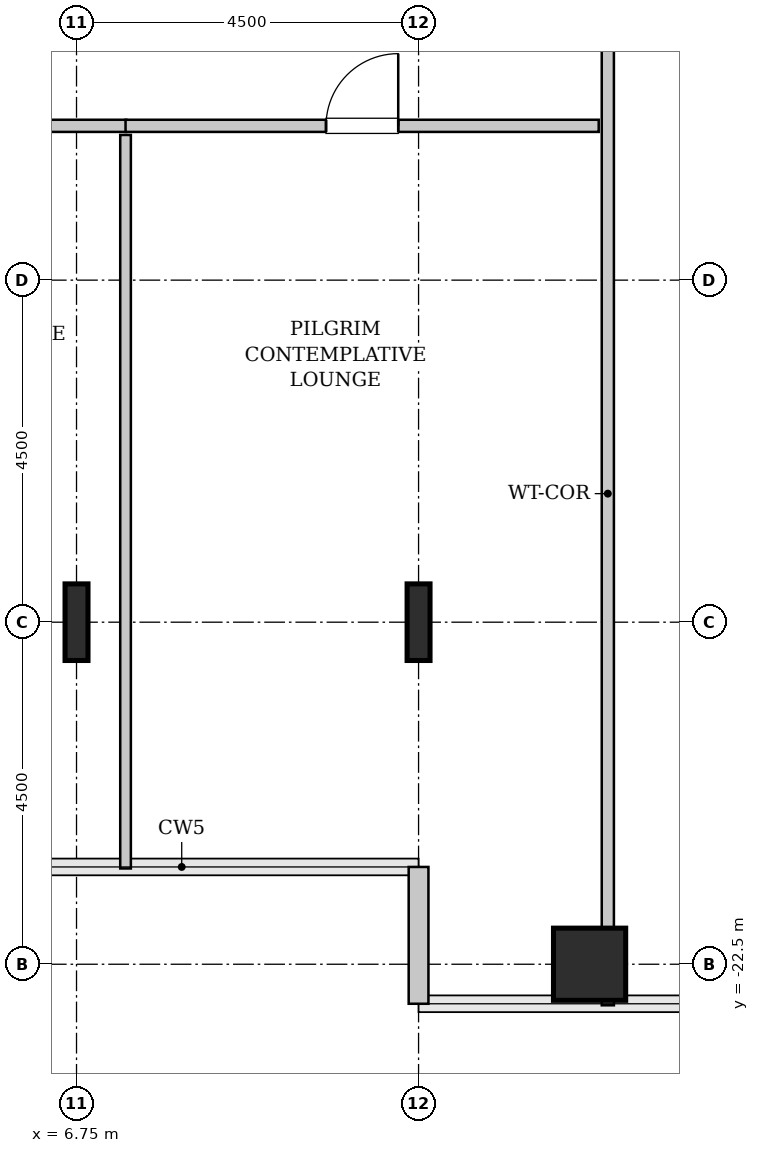
"""IFC4 building model, lengths in metres.
Left out: names, types, materials, properties, quantities, classifications, styles, units other than length and angle.
Written with IfcOpenShell. Run it as: python <this file> out.ifc"""

import sys

from ifc_helpers import new_model, si_unit, direction, frame, frame_2d, origin, origin_2d, place, context, subcontext, project, spatial, rectangle, hollow_rectangle, i_section, extrude, source, transform, mapped, element, fill, save


model = new_model("IFC4")
c1 = context("Model", 3, precision=1e-05, world=origin(), true_north=direction((0.0, 1.0)))
c2 = subcontext(c1, "Body", "Model", "MODEL_VIEW")
j1 = project(units=[si_unit("LENGTHUNIT", "METRE"), si_unit("PLANEANGLEUNIT", "RADIAN")], contexts=[c1])
p1 = place(None, origin())
s1 = spatial("IfcSite", under=j1, at=p1, CompositionType="ELEMENT")
p2 = place(p1, origin())
s2 = spatial("IfcBuilding", under=s1, at=p2, CompositionType="ELEMENT")
p3 = place(p2, frame((0.0, 0.0, 90.8)))
s3 = spatial("IfcBuildingStorey", under=s2, at=p3, CompositionType="ELEMENT", Elevation=90.8)
m1 = source(origin(), c2, "Body", "SweptSolid", [
    extrude(i_section(OverallWidth=0.302, OverallDepth=1.008, WebThickness=0.021, FlangeThickness=0.04, FilletRadius=0.03, at=origin_2d()), origin(), (0.0, 0.0, 1.0), 3.8),
])
for number, where, z_axis, x_axis in (
    (1, (6.75, -18.0, 0.0), (0.0, 0.0, 1.0), (1.0, 0.0, 0.0)),
    (2, (11.25, -18.0, 0.0), (0.0, 0.0, 1.0), (1.0, 0.0, 0.0)),
):
    element("IfcColumn", number, at=place(p3, frame(where, z_axis=z_axis, x_axis=x_axis)), inside=s3, PredefinedType="COLUMN", context=c2, shape_type="MappedRepresentation", body=[
        mapped(m1, transform((0.0, 0.0, 0.0), x_axis=(1.0, 0.0, 0.0), y_axis=(0.0, 1.0, 0.0), z_axis=(0.0, 0.0, 1.0), scale=1.0)),
    ])
m2 = source(origin(), c2, "Body", "SweptSolid", [
    extrude(hollow_rectangle(XDim=0.95, YDim=0.95, WallThickness=0.045, InnerFilletRadius=0.045, OuterFilletRadius=0.09, at=origin_2d()), origin(), (0.0, 0.0, 1.0), 3.8),
])
p4 = place(p3, frame((13.5, -22.5, 0.0), z_axis=(0.0, 0.0, 1.0), x_axis=(1.0, 0.0, 0.0)))
e3 = element("IfcColumn", 3, at=p4, inside=s3, PredefinedType="COLUMN", context=c2, shape_type="MappedRepresentation", body=[
    mapped(m2, transform((0.0, 0.0, 0.0), x_axis=(1.0, 0.0, 0.0), y_axis=(0.0, 1.0, 0.0), z_axis=(0.0, 0.0, 1.0), scale=1.0)),
])
m3 = source(origin(), c2, "Body", "SweptSolid", [
    extrude(rectangle(XDim=1.8, YDim=0.26, at=frame_2d((0.9, 0.0))), origin(), (0.0, 0.0, 1.0), 3.55),
])
p5 = place(p3, frame((11.25, -21.22, 0.0), z_axis=(0.0, 0.0, 1.0), x_axis=(0.0, -1.0, 0.0)))
e4 = element("IfcWall", 4, at=p5, inside=s3, PredefinedType="SOLIDWALL", context=c2, shape_type="MappedRepresentation", body=[
    mapped(m3, transform((0.0, 0.0, 0.0), x_axis=(1.0, 0.0, 0.0), y_axis=(0.0, 1.0, 0.0), z_axis=(0.0, 0.0, 1.0), scale=1.0)),
])
m4 = source(origin(), c2, "Body", "SweptSolid", [
    extrude(rectangle(XDim=16.245, YDim=0.16, at=frame_2d((8.123, 0.0))), origin(), (0.0, 0.0, 1.0), 3.535),
])
p6 = place(p3, frame((13.74, -23.04, 0.0), z_axis=(0.0, 0.0, 1.0), x_axis=(0.0, 1.0, 0.0)))
e5 = element("IfcWall", 5, at=p6, inside=s3, PredefinedType="PARTITIONING", context=c2, shape_type="MappedRepresentation", body=[
    mapped(m4, transform((0.0, 0.0, 0.0), x_axis=(1.0, 0.0, 0.0), y_axis=(0.0, 1.0, 0.0), z_axis=(0.0, 0.0, 1.0), scale=1.0)),
])
p7 = place(p6, frame((13.413, 0.0, 0.0)))
e6 = element("IfcOpeningElement", 6, at=p7, cuts=e5, PredefinedType="OPENING", context=c2, shape_type="SweptSolid", body=[
    extrude(rectangle(XDim=0.95, YDim=2.1, at=frame_2d((0.475, 1.05))), frame((0.0, 0.09, 0.0), z_axis=(0.0, -1.0, 0.0), x_axis=(1.0, 0.0, 0.0)), (0.0, 0.0, 1.0), 0.18),
])
m5 = source(origin(), c2, "Body", "SweptSolid", [
    extrude(rectangle(XDim=3.905, YDim=0.16, at=frame_2d((1.953, 0.0))), origin(), (0.0, 0.0, 1.0), 3.535),
])
p8 = place(p3, frame((3.5, -11.47, 0.0), z_axis=(0.0, 0.0, 1.0), x_axis=(1.0, 0.0, 0.0)))
e7 = element("IfcWall", 7, at=p8, inside=s3, PredefinedType="PARTITIONING", context=c2, shape_type="MappedRepresentation", body=[
    mapped(m5, transform((0.0, 0.0, 0.0), x_axis=(1.0, 0.0, 0.0), y_axis=(0.0, 1.0, 0.0), z_axis=(0.0, 0.0, 1.0), scale=1.0)),
])
p9 = place(p8, frame((1.478, 0.0, 0.0)))
e8 = element("IfcOpeningElement", 8, at=p9, cuts=e7, PredefinedType="OPENING", context=c2, shape_type="SweptSolid", body=[
    extrude(rectangle(XDim=0.95, YDim=2.1, at=frame_2d((0.475, 1.05))), frame((0.0, 0.09, 0.0), z_axis=(0.0, -1.0, 0.0), x_axis=(1.0, 0.0, 0.0)), (0.0, 0.0, 1.0), 0.18),
])
m6 = source(origin(), c2, "Body", "SweptSolid", [
    extrude(rectangle(XDim=9.65, YDim=0.14, at=frame_2d((4.825, 0.0))), origin(), (0.0, 0.0, 1.0), 3.535),
])
p10 = place(p3, frame((7.395, -21.24, 0.0), z_axis=(0.0, 0.0, 1.0), x_axis=(0.0, 1.0, 0.0)))
e9 = element("IfcWall", 9, at=p10, inside=s3, PredefinedType="PARTITIONING", context=c2, shape_type="MappedRepresentation", body=[
    mapped(m6, transform((0.0, 0.0, 0.0), x_axis=(1.0, 0.0, 0.0), y_axis=(0.0, 1.0, 0.0), z_axis=(0.0, 0.0, 1.0), scale=1.0)),
])
m7 = source(origin(), c2, "Body", "SweptSolid", [
    extrude(rectangle(XDim=6.225, YDim=0.16, at=frame_2d((3.113, 0.0))), origin(), (0.0, 0.0, 1.0), 3.535),
])
p11 = place(p3, frame((7.395, -11.47, 0.0), z_axis=(0.0, 0.0, 1.0), x_axis=(1.0, 0.0, 0.0)))
e10 = element("IfcWall", 10, at=p11, inside=s3, PredefinedType="PARTITIONING", context=c2, shape_type="MappedRepresentation", body=[
    mapped(m7, transform((0.0, 0.0, 0.0), x_axis=(1.0, 0.0, 0.0), y_axis=(0.0, 1.0, 0.0), z_axis=(0.0, 0.0, 1.0), scale=1.0)),
])
p12 = place(p11, frame((2.637, 0.0, 0.0)))
e11 = element("IfcOpeningElement", 11, at=p12, cuts=e10, PredefinedType="OPENING", context=c2, shape_type="SweptSolid", body=[
    extrude(rectangle(XDim=0.95, YDim=2.1, at=frame_2d((0.475, 1.05))), frame((0.0, 0.09, 0.0), z_axis=(0.0, -1.0, 0.0), x_axis=(1.0, 0.0, 0.0)), (0.0, 0.0, 1.0), 0.18),
])
m8 = source(origin(), c2, "Body", "SweptSolid", [
    extrude(rectangle(XDim=0.95, YDim=2.1, at=frame_2d((0.475, 1.05))), frame((0.0, 0.025, 0.0), z_axis=(0.0, -1.0, 0.0), x_axis=(1.0, 0.0, 0.0)), (0.0, 0.0, 1.0), 0.05),
])
p13 = place(p12, origin())
e12 = element("IfcDoor", 12, at=p13, inside=s3, OperationType="SINGLE_SWING_RIGHT", PredefinedType="DOOR", context=c2, shape_type="MappedRepresentation", body=[
    mapped(m8, transform((0.0, 0.0, 0.0), x_axis=(1.0, 0.0, 0.0), y_axis=(0.0, 1.0, 0.0), z_axis=(0.0, 0.0, 1.0), scale=1.0)),
])
fill(e11, e12)
save(model, sys.argv[1])
